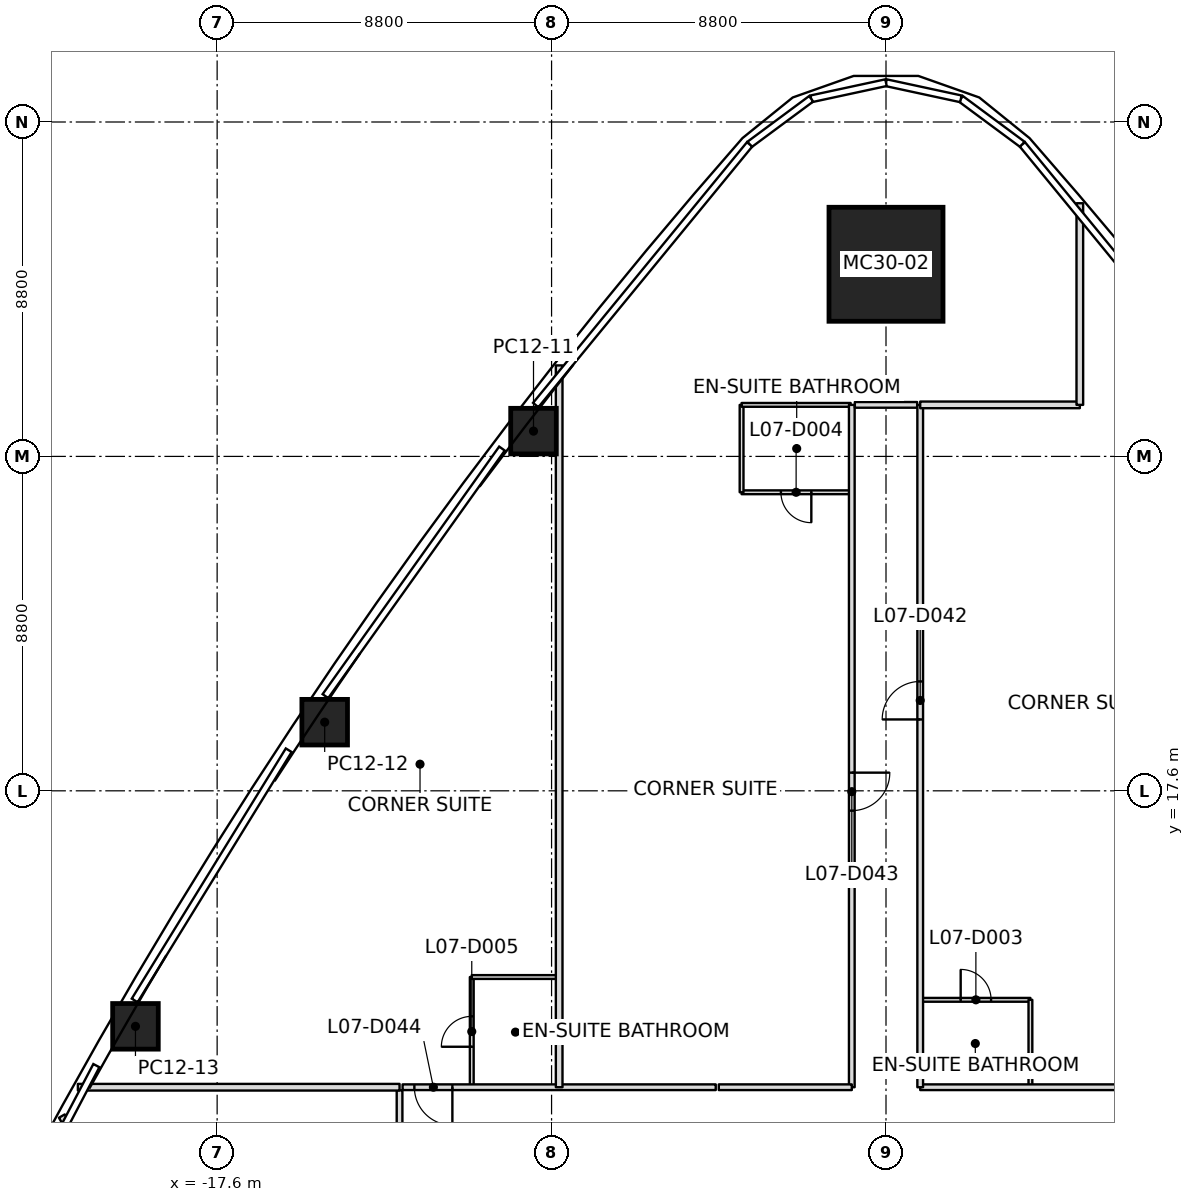
"""IFC4 building model, lengths in metres.
Left out: names, types, materials, properties, quantities, classifications, styles, units other than length and angle.
Written with IfcOpenShell. Run it as: python <this file> out.ifc"""

import sys

from ifc_helpers import new_model, si_unit, direction, frame, frame_2d, origin, origin_2d, place, context, subcontext, project, spatial, rectangle, extrude, clip, halfspace, element, fill, save


model = new_model("IFC4")
c1 = context("Model", 3, precision=1e-05, world=origin(), true_north=direction((0.0, 1.0)))
c2 = subcontext(c1, "Body", "Model", "MODEL_VIEW")
j1 = project(units=[si_unit("LENGTHUNIT", "METRE"), si_unit("PLANEANGLEUNIT", "RADIAN")], contexts=[c1])
p1 = place(None, origin())
s1 = spatial("IfcSite", under=j1, at=p1, CompositionType="ELEMENT")
p2 = place(p1, origin())
s2 = spatial("IfcBuilding", under=s1, at=p2, CompositionType="ELEMENT")
p3 = place(p2, frame((0.0, 0.0, 48.0)))
s3 = spatial("IfcBuildingStorey", under=s2, at=p3, CompositionType="ELEMENT", Elevation=48.0)
p4 = place(p3, frame((0.0, 31.456, 0.0), z_axis=(0.0, -0.03534576554, 0.999375143206), x_axis=(1.0, 0.0, 0.0)))
e1 = element("IfcColumn", 1, at=p4, inside=s3, PredefinedType="COLUMN", context=c2, shape_type="SweptSolid", body=[
    clip(extrude(rectangle(XDim=3.0, YDim=3.0, at=origin_2d()), origin(), (0.0, 0.0, 1.0), 3.702), halfspace(frame((0.0, 0.0, 0.013)), True)),
])
p5 = place(p3, frame((-9.275, 27.065, 0.0), z_axis=(0.00019790496, -0.022363260521, 0.999749891429), x_axis=(0.609322053377, 0.792727229496, 0.017611782556)))
e2 = element("IfcColumn", 2, at=p5, inside=s3, PredefinedType="COLUMN", context=c2, shape_type="SweptSolid", body=[
    clip(extrude(rectangle(XDim=1.2, YDim=1.2, at=origin_2d()), origin(), (0.0, 0.0, 1.0), 3.701), halfspace(frame((0.0, 0.0, 0.005)), True)),
])
p6 = place(p3, frame((-14.77, 19.406, 0.0), z_axis=(0.005674016471, -0.014382971985, 0.999880460682), x_axis=(0.555854390577, 0.831233065073, 0.008802727192)))
e3 = element("IfcColumn", 3, at=p6, inside=s3, PredefinedType="COLUMN", context=c2, shape_type="SweptSolid", body=[
    clip(extrude(rectangle(XDim=1.2, YDim=1.2, at=origin_2d()), origin(), (0.0, 0.0, 1.0), 3.7), halfspace(frame((0.0, 0.0, 0.003)), True)),
])
p7 = place(p3, frame((-19.749, 11.402, 0.0), z_axis=(0.010688729499, -0.00613612249, 0.999924046647), x_axis=(0.49997143695, 0.866041893524, -2.9922579e-05)))
e4 = element("IfcColumn", 4, at=p7, inside=s3, PredefinedType="COLUMN", context=c2, shape_type="SweptSolid", body=[
    clip(extrude(rectangle(XDim=1.2, YDim=1.2, at=origin_2d()), origin(), (0.0, 0.0, 1.0), 3.7), halfspace(frame((0.0, 0.0, 0.002)), True)),
])
p8 = place(p3, frame((-21.686, 9.041, 0.0), z_axis=(0.0, 0.0, 1.0), x_axis=(0.499975971767, -0.866039276047, 0.0)))
e5 = element("IfcWall", 5, at=p8, inside=s3, PredefinedType="PARTITIONING", context=c2, shape_type="SweptSolid", body=[
    extrude(rectangle(XDim=3.223, YDim=0.175, at=frame_2d((1.612, 0.0))), origin(), (0.0, 0.0, 1.0), 2.934),
])
p9 = place(p3, frame((-12.8, 9.8, 0.0), z_axis=(0.0, 0.0, 1.0), x_axis=(-1.0, 0.0, 0.0)))
e6 = element("IfcWall", 6, at=p9, inside=s3, PredefinedType="PARTITIONING", context=c2, shape_type="SweptSolid", body=[
    extrude(rectangle(XDim=8.464, YDim=0.175, at=frame_2d((4.232, 0.0))), origin(), (0.0, 0.0, 1.0), 2.934),
])
p10 = place(p3, frame((-8.6, 9.8, 0.0), z_axis=(0.0, 0.0, 1.0), x_axis=(0.0, 1.0, 0.0)))
e7 = element("IfcWall", 7, at=p10, inside=s3, PredefinedType="PARTITIONING", context=c2, shape_type="SweptSolid", body=[
    extrude(rectangle(XDim=18.995, YDim=0.175, at=frame_2d((9.497, 0.0))), origin(), (0.0, 0.0, 1.0), 2.934),
])
p11 = place(p3, frame((0.9, 27.756, 0.0), z_axis=(0.0, 0.0, 1.0), x_axis=(1.0, 0.0, 0.0)))
e8 = element("IfcWall", 8, at=p11, inside=s3, PredefinedType="PARTITIONING", context=c2, shape_type="SweptSolid", body=[
    extrude(rectangle(XDim=4.2, YDim=0.175, at=frame_2d((2.1, 0.0))), origin(), (0.0, 0.0, 1.0), 3.15),
])
p12 = place(p3, frame((5.1, 27.756, 0.0), z_axis=(0.0, 0.0, 1.0), x_axis=(0.0, 1.0, 0.0)))
e9 = element("IfcWall", 9, at=p12, inside=s3, PredefinedType="PARTITIONING", context=c2, shape_type="SweptSolid", body=[
    extrude(rectangle(XDim=5.306, YDim=0.175, at=frame_2d((2.653, 0.0))), origin(), (0.0, 0.0, 1.0), 2.934),
])
p13 = place(p3, frame((-12.8, 9.72, 0.0), z_axis=(0.0, 0.0, 1.0), x_axis=(0.0, -1.0, 0.0)))
e10 = element("IfcWall", 10, at=p13, inside=s3, PredefinedType="PARTITIONING", context=c2, shape_type="SweptSolid", body=[
    extrude(rectangle(XDim=16.071, YDim=0.15, at=frame_2d((8.035, 0.0))), origin(), (0.0, 0.0, 1.0), 3.017),
])
p14 = place(p13, frame((1.195, 0.0, 0.0)))
e11 = element("IfcOpeningElement", 11, at=p14, cuts=e10, PredefinedType="OPENING", context=c2, shape_type="SweptSolid", body=[
    extrude(rectangle(XDim=1.0, YDim=2.1, at=frame_2d((0.5, 1.05))), frame((0.0, 0.075, 0.0), z_axis=(0.0, -1.0, 0.0), x_axis=(1.0, 0.0, 0.0)), (0.0, 0.0, 1.0), 0.15),
])
p15 = place(p13, frame((10.471, 0.0, 0.0)))
e12 = element("IfcOpeningElement", 12, at=p15, cuts=e10, PredefinedType="OPENING", context=c2, shape_type="SweptSolid", body=[
    extrude(rectangle(XDim=1.0, YDim=2.1, at=frame_2d((0.5, 1.05))), frame((0.0, 0.075, 0.0), z_axis=(0.0, -1.0, 0.0), x_axis=(1.0, 0.0, 0.0)), (0.0, 0.0, 1.0), 0.15),
])
p16 = place(p3, frame((-4.48, 9.8, 0.0), z_axis=(0.0, 0.0, 1.0), x_axis=(-1.0, 0.0, 0.0)))
e13 = element("IfcWall", 13, at=p16, inside=s3, PredefinedType="PARTITIONING", context=c2, shape_type="SweptSolid", body=[
    extrude(rectangle(XDim=8.24, YDim=0.15, at=frame_2d((4.12, 0.0))), origin(), (0.0, 0.0, 1.0), 3.017),
])
p17 = place(p16, frame((6.93, 0.0, 0.0)))
e14 = element("IfcOpeningElement", 14, at=p17, cuts=e13, PredefinedType="OPENING", context=c2, shape_type="SweptSolid", body=[
    extrude(rectangle(XDim=1.0, YDim=2.1, at=frame_2d((0.5, 1.05))), frame((0.0, 0.075, 0.0), z_axis=(0.0, -1.0, 0.0), x_axis=(1.0, 0.0, 0.0)), (0.0, 0.0, 1.0), 0.15),
])
p18 = place(p3, frame((-0.9, 27.756, 0.0), z_axis=(0.0, 0.0, 1.0), x_axis=(0.0, -1.0, 0.0)))
e15 = element("IfcWall", 15, at=p18, inside=s3, PredefinedType="PARTITIONING", context=c2, shape_type="SweptSolid", body=[
    extrude(rectangle(XDim=17.956, YDim=0.15, at=frame_2d((8.978, 0.0))), origin(), (0.0, 0.0, 1.0), 2.947),
])
p19 = place(p18, frame((9.678, 0.0, 0.0)))
e16 = element("IfcOpeningElement", 16, at=p19, cuts=e15, PredefinedType="OPENING", context=c2, shape_type="SweptSolid", body=[
    extrude(rectangle(XDim=1.0, YDim=2.1, at=frame_2d((0.5, 1.05))), frame((0.0, 0.075, 0.0), z_axis=(0.0, -1.0, 0.0), x_axis=(1.0, 0.0, 0.0)), (0.0, 0.0, 1.0), 0.15),
])
p20 = place(p3, frame((-0.9, 9.8, 0.0), z_axis=(0.0, 0.0, 1.0), x_axis=(-1.0, 0.0, 0.0)))
e17 = element("IfcWall", 17, at=p20, inside=s3, PredefinedType="PARTITIONING", context=c2, shape_type="SweptSolid", body=[
    extrude(rectangle(XDim=3.5, YDim=0.15, at=frame_2d((1.75, 0.0))), origin(), (0.0, 0.0, 1.0), 2.947),
])
p21 = place(p3, frame((0.82, 27.756, 0.0), z_axis=(0.0, 0.0, 1.0), x_axis=(-1.0, 0.0, 0.0)))
e18 = element("IfcWall", 18, at=p21, inside=s3, PredefinedType="PARTITIONING", context=c2, shape_type="SweptSolid", body=[
    extrude(rectangle(XDim=1.64, YDim=0.15, at=frame_2d((0.82, 0.0))), origin(), (0.0, 0.0, 1.0), 2.797),
])
p22 = place(p3, frame((9.22, 9.8, 0.0), z_axis=(0.0, 0.0, 1.0), x_axis=(-1.0, 0.0, 0.0)))
e19 = element("IfcWall", 19, at=p22, inside=s3, PredefinedType="PARTITIONING", context=c2, shape_type="SweptSolid", body=[
    extrude(rectangle(XDim=8.32, YDim=0.15, at=frame_2d((4.16, 0.0))), origin(), (0.0, 0.0, 1.0), 2.947),
])
p23 = place(p3, frame((0.9, 9.8, 0.0), z_axis=(0.0, 0.0, 1.0), x_axis=(0.0, 1.0, 0.0)))
e20 = element("IfcWall", 20, at=p23, inside=s3, PredefinedType="PARTITIONING", context=c2, shape_type="SweptSolid", body=[
    extrude(rectangle(XDim=17.956, YDim=0.15, at=frame_2d((8.978, 0.0))), origin(), (0.0, 0.0, 1.0), 2.947),
])
p24 = place(p23, frame((9.678, 0.0, 0.0)))
e21 = element("IfcOpeningElement", 21, at=p24, cuts=e20, PredefinedType="OPENING", context=c2, shape_type="SweptSolid", body=[
    extrude(rectangle(XDim=1.0, YDim=2.1, at=frame_2d((0.5, 1.05))), frame((0.0, 0.075, 0.0), z_axis=(0.0, -1.0, 0.0), x_axis=(1.0, 0.0, 0.0)), (0.0, 0.0, 1.0), 0.15),
])
p25 = place(p3, frame((-10.9, 9.83, 0.0), z_axis=(0.0, 0.0, 1.0), x_axis=(0.0, 1.0, 0.0)))
e22 = element("IfcWall", 22, at=p25, inside=s3, PredefinedType="PARTITIONING", context=c2, shape_type="SweptSolid", body=[
    extrude(rectangle(XDim=2.87, YDim=0.1, at=frame_2d((1.435, 0.0))), origin(), (0.0, 0.0, 1.0), 3.017),
])
p26 = place(p25, frame((1.035, 0.0, 0.0)))
e23 = element("IfcOpeningElement", 23, at=p26, cuts=e22, PredefinedType="OPENING", context=c2, shape_type="SweptSolid", body=[
    extrude(rectangle(XDim=0.8, YDim=2.1, at=frame_2d((0.4, 1.05))), frame((0.0, 0.05, 0.0), z_axis=(0.0, -1.0, 0.0), x_axis=(1.0, 0.0, 0.0)), (0.0, 0.0, 1.0), 0.1),
])
p27 = place(p3, frame((-10.9, 12.7, 0.0), z_axis=(0.0, 0.0, 1.0), x_axis=(1.0, 0.0, 0.0)))
e24 = element("IfcWall", 24, at=p27, inside=s3, PredefinedType="PARTITIONING", context=c2, shape_type="SweptSolid", body=[
    extrude(rectangle(XDim=2.27, YDim=0.1, at=frame_2d((1.135, 0.0))), origin(), (0.0, 0.0, 1.0), 2.947),
])
p28 = place(p3, frame((-0.93, 25.456, 0.0), z_axis=(0.0, 0.0, 1.0), x_axis=(-1.0, 0.0, 0.0)))
e25 = element("IfcWall", 25, at=p28, inside=s3, PredefinedType="PARTITIONING", context=c2, shape_type="SweptSolid", body=[
    extrude(rectangle(XDim=2.87, YDim=0.1, at=frame_2d((1.435, 0.0))), origin(), (0.0, 0.0, 1.0), 3.15),
])
p29 = place(p28, frame((1.035, 0.0, 0.0)))
e26 = element("IfcOpeningElement", 26, at=p29, cuts=e25, PredefinedType="OPENING", context=c2, shape_type="SweptSolid", body=[
    extrude(rectangle(XDim=0.8, YDim=2.1, at=frame_2d((0.4, 1.05))), frame((0.0, 0.05, 0.0), z_axis=(0.0, -1.0, 0.0), x_axis=(1.0, 0.0, 0.0)), (0.0, 0.0, 1.0), 0.1),
])
p30 = place(p3, frame((-3.8, 25.456, 0.0), z_axis=(0.0, 0.0, 1.0), x_axis=(0.0, 1.0, 0.0)))
e27 = element("IfcWall", 27, at=p30, inside=s3, PredefinedType="PARTITIONING", context=c2, shape_type="SweptSolid", body=[
    extrude(rectangle(XDim=2.3, YDim=0.1, at=frame_2d((1.15, 0.0))), origin(), (0.0, 0.0, 1.0), 3.15),
])
p31 = place(p3, frame((-3.8, 27.756, 0.0), z_axis=(0.0, 0.0, 1.0), x_axis=(1.0, 0.0, 0.0)))
e28 = element("IfcWall", 28, at=p31, inside=s3, PredefinedType="PARTITIONING", context=c2, shape_type="SweptSolid", body=[
    extrude(rectangle(XDim=2.87, YDim=0.1, at=frame_2d((1.435, 0.0))), origin(), (0.0, 0.0, 1.0), 3.15),
])
p32 = place(p3, frame((0.93, 12.1, 0.0), z_axis=(0.0, 0.0, 1.0), x_axis=(1.0, 0.0, 0.0)))
e29 = element("IfcWall", 29, at=p32, inside=s3, PredefinedType="PARTITIONING", context=c2, shape_type="SweptSolid", body=[
    extrude(rectangle(XDim=2.87, YDim=0.1, at=frame_2d((1.435, 0.0))), origin(), (0.0, 0.0, 1.0), 3.15),
])
p33 = place(p32, frame((1.035, 0.0, 0.0)))
e30 = element("IfcOpeningElement", 30, at=p33, cuts=e29, PredefinedType="OPENING", context=c2, shape_type="SweptSolid", body=[
    extrude(rectangle(XDim=0.8, YDim=2.1, at=frame_2d((0.4, 1.05))), frame((0.0, 0.05, 0.0), z_axis=(0.0, -1.0, 0.0), x_axis=(1.0, 0.0, 0.0)), (0.0, 0.0, 1.0), 0.1),
])
p34 = place(p3, frame((3.8, 12.1, 0.0), z_axis=(0.0, 0.0, 1.0), x_axis=(0.0, -1.0, 0.0)))
e31 = element("IfcWall", 31, at=p34, inside=s3, PredefinedType="PARTITIONING", context=c2, shape_type="SweptSolid", body=[
    extrude(rectangle(XDim=2.27, YDim=0.1, at=frame_2d((1.135, 0.0))), origin(), (0.0, 0.0, 1.0), 3.15),
])
p35 = place(p24, origin())
e32 = element("IfcDoor", 32, at=p35, inside=s3, OperationType="SINGLE_SWING_LEFT", PredefinedType="DOOR", context=c2, shape_type="SweptSolid", body=[
    extrude(rectangle(XDim=1.0, YDim=2.1, at=frame_2d((0.5, 1.05))), frame((0.0, 0.025, 0.0), z_axis=(0.0, -1.0, 0.0), x_axis=(1.0, 0.0, 0.0)), (0.0, 0.0, 1.0), 0.05),
])
fill(e21, e32)
p36 = place(p33, origin())
e33 = element("IfcDoor", 33, at=p36, inside=s3, OperationType="SINGLE_SWING_LEFT", PredefinedType="DOOR", context=c2, shape_type="SweptSolid", body=[
    extrude(rectangle(XDim=0.8, YDim=2.1, at=frame_2d((0.4, 1.05))), frame((0.0, 0.025, 0.0), z_axis=(0.0, -1.0, 0.0), x_axis=(1.0, 0.0, 0.0)), (0.0, 0.0, 1.0), 0.05),
])
fill(e30, e33)
p37 = place(p19, origin())
e34 = element("IfcDoor", 34, at=p37, inside=s3, OperationType="SINGLE_SWING_RIGHT", PredefinedType="DOOR", context=c2, shape_type="SweptSolid", body=[
    extrude(rectangle(XDim=1.0, YDim=2.1, at=frame_2d((0.5, 1.05))), frame((0.0, 0.025, 0.0), z_axis=(0.0, -1.0, 0.0), x_axis=(1.0, 0.0, 0.0)), (0.0, 0.0, 1.0), 0.05),
])
fill(e16, e34)
p38 = place(p29, origin())
e35 = element("IfcDoor", 35, at=p38, inside=s3, OperationType="SINGLE_SWING_LEFT", PredefinedType="DOOR", context=c2, shape_type="SweptSolid", body=[
    extrude(rectangle(XDim=0.8, YDim=2.1, at=frame_2d((0.4, 1.05))), frame((0.0, 0.025, 0.0), z_axis=(0.0, -1.0, 0.0), x_axis=(1.0, 0.0, 0.0)), (0.0, 0.0, 1.0), 0.05),
])
fill(e26, e35)
p39 = place(p17, origin())
e36 = element("IfcDoor", 36, at=p39, inside=s3, OperationType="SINGLE_SWING_LEFT", PredefinedType="DOOR", context=c2, shape_type="SweptSolid", body=[
    extrude(rectangle(XDim=1.0, YDim=2.1, at=frame_2d((0.5, 1.05))), frame((0.0, 0.025, 0.0), z_axis=(0.0, -1.0, 0.0), x_axis=(1.0, 0.0, 0.0)), (0.0, 0.0, 1.0), 0.05),
])
fill(e14, e36)
p40 = place(p26, origin())
e37 = element("IfcDoor", 37, at=p40, inside=s3, OperationType="SINGLE_SWING_RIGHT", PredefinedType="DOOR", context=c2, shape_type="SweptSolid", body=[
    extrude(rectangle(XDim=0.8, YDim=2.1, at=frame_2d((0.4, 1.05))), frame((0.0, 0.025, 0.0), z_axis=(0.0, -1.0, 0.0), x_axis=(1.0, 0.0, 0.0)), (0.0, 0.0, 1.0), 0.05),
])
fill(e23, e37)
save(model, sys.argv[1])
